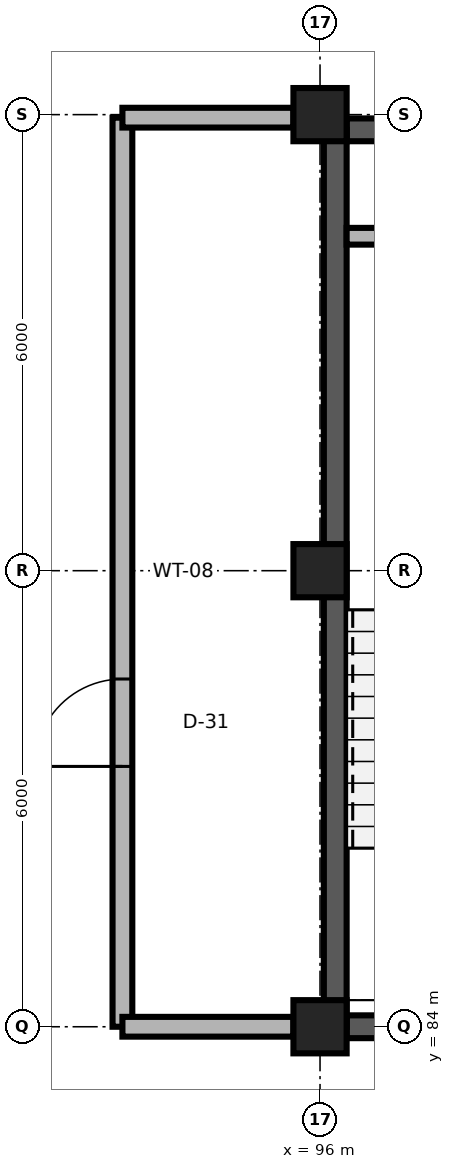
"""IFC4 building model, lengths in metres.
Left out: names, types, materials, properties, quantities, classifications, styles, units other than length and angle.
Written with IfcOpenShell. Run it as: python <this file> out.ifc"""

import sys

from ifc_helpers import new_model, si_unit, direction, frame, frame_2d, origin, origin_2d, place, context, subcontext, project, spatial, rectangle, extrude, element, fill, save


model = new_model("IFC4")
c1 = context("Model", 3, precision=1e-05, world=origin(), true_north=direction((0.0, 1.0)))
c2 = subcontext(c1, "Body", "Model", "MODEL_VIEW")
j1 = project(units=[si_unit("LENGTHUNIT", "METRE"), si_unit("PLANEANGLEUNIT", "RADIAN")], contexts=[c1])
p1 = place(None, origin())
s1 = spatial("IfcSite", under=j1, at=p1, CompositionType="ELEMENT")
p2 = place(p1, origin())
s2 = spatial("IfcBuilding", under=s1, at=p2, CompositionType="ELEMENT")
p3 = place(p2, frame((0.0, 0.0, 63.9)))
s3 = spatial("IfcBuildingStorey", under=s2, at=p3, CompositionType="ELEMENT", Elevation=63.9)
for number, where, z_axis, x_axis in (
    (1, (96.0, 84.0, 0.0), (0.0, 0.0, 1.0), (1.0, 0.0, 0.0)),
    (2, (96.0, 90.0, 0.0), (0.0, 0.0, 1.0), (1.0, 0.0, 0.0)),
    (3, (96.0, 96.0, 0.0), (0.0, 0.0, 1.0), (1.0, 0.0, 0.0)),
):
    element("IfcColumn", number, at=place(p3, frame(where, z_axis=z_axis, x_axis=x_axis)), inside=s3, PredefinedType="COLUMN", context=c2, shape_type="SweptSolid", body=[
        extrude(rectangle(XDim=0.7, YDim=0.7, at=origin_2d()), origin(), (0.0, 0.0, 1.0), 3.9),
    ])
p4 = place(p3, frame((96.35, 84.0, 0.0), z_axis=(0.0, 0.0, 1.0), x_axis=(1.0, 0.0, 0.0)))
e4 = element("IfcWall", 4, at=p4, inside=s3, PredefinedType="SHEAR", context=c2, shape_type="SweptSolid", body=[
    extrude(rectangle(XDim=5.3, YDim=0.3, at=frame_2d((2.65, 0.0))), origin(), (0.0, 0.0, 1.0), 3.66),
])
p5 = place(p4, frame((1.975, 0.0, 0.0)))
e5 = element("IfcOpeningElement", 5, at=p5, cuts=e4, PredefinedType="OPENING", context=c2, shape_type="SweptSolid", body=[
    extrude(rectangle(XDim=1.35, YDim=2.2, at=frame_2d((0.675, 1.1))), frame((0.0, 0.165, 0.0), z_axis=(0.0, -1.0, 0.0), x_axis=(1.0, 0.0, 0.0)), (0.0, 0.0, 1.0), 0.33),
])
p6 = place(p3, frame((96.35, 95.8, 0.0), z_axis=(0.0, 0.0, 1.0), x_axis=(1.0, 0.0, 0.0)))
e6 = element("IfcWall", 6, at=p6, inside=s3, PredefinedType="SHEAR", context=c2, shape_type="SweptSolid", body=[
    extrude(rectangle(XDim=5.3, YDim=0.3, at=frame_2d((2.65, 0.0))), origin(), (0.0, 0.0, 1.0), 3.66),
])
p7 = place(p3, frame((96.2, 84.0, 0.0), z_axis=(0.0, 0.0, 1.0), x_axis=(0.0, 1.0, 0.0)))
e7 = element("IfcWall", 7, at=p7, inside=s3, PredefinedType="SHEAR", context=c2, shape_type="SweptSolid", body=[
    extrude(rectangle(XDim=11.8, YDim=0.3, at=frame_2d((5.9, 0.0))), origin(), (0.0, 0.0, 1.0), 3.66),
])
p8 = place(p3, frame((96.35, 94.4, 0.0), z_axis=(0.0, 0.0, 1.0), x_axis=(1.0, 0.0, 0.0)))
e8 = element("IfcWall", 8, at=p8, inside=s3, PredefinedType="PARTITIONING", context=c2, shape_type="SweptSolid", body=[
    extrude(rectangle(XDim=1.1, YDim=0.22, at=frame_2d((0.55, 0.0))), origin(), (0.0, 0.0, 1.0), 3.66),
])
p9 = place(p3, frame((93.4, 84.0, 0.0), z_axis=(0.0, 0.0, 1.0), x_axis=(0.0, 1.0, 0.0)))
e9 = element("IfcWall", 9, at=p9, inside=s3, PredefinedType="PARTITIONING", context=c2, shape_type="SweptSolid", body=[
    extrude(rectangle(XDim=11.96, YDim=0.26, at=frame_2d((5.98, 0.0))), origin(), (0.0, 0.0, 1.0), 3.66),
])
p10 = place(p9, frame((3.425, 0.0, 0.0)))
e10 = element("IfcOpeningElement", 10, at=p10, cuts=e9, PredefinedType="OPENING", context=c2, shape_type="SweptSolid", body=[
    extrude(rectangle(XDim=1.15, YDim=2.2, at=frame_2d((0.575, 1.1))), frame((0.0, 0.145, 0.0), z_axis=(0.0, -1.0, 0.0), x_axis=(1.0, 0.0, 0.0)), (0.0, 0.0, 1.0), 0.29),
])
for number, where, z_axis, x_axis in (
    (11, (93.4, 84.0, 0.0), (0.0, 0.0, 1.0), (1.0, 0.0, 0.0)),
    (12, (93.4, 95.96, 0.0), (0.0, 0.0, 1.0), (1.0, 0.0, 0.0)),
):
    element("IfcWall", number, at=place(p3, frame(where, z_axis=z_axis, x_axis=x_axis)), inside=s3, PredefinedType="PARTITIONING", context=c2, shape_type="SweptSolid", body=[
        extrude(rectangle(XDim=2.25, YDim=0.26, at=frame_2d((1.125, 0.0))), origin(), (0.0, 0.0, 1.0), 3.369),
    ])
p11 = place(p10, origin())
e13 = element("IfcDoor", 13, at=p11, inside=s3, OperationType="SINGLE_SWING_LEFT", PredefinedType="DOOR", context=c2, shape_type="SweptSolid", body=[
    extrude(rectangle(XDim=1.15, YDim=2.2, at=frame_2d((0.575, 1.1))), frame((0.0, 0.025, 0.0), z_axis=(0.0, -1.0, 0.0), x_axis=(1.0, 0.0, 0.0)), (0.0, 0.0, 1.0), 0.05),
])
fill(e10, e13)
save(model, sys.argv[1])
